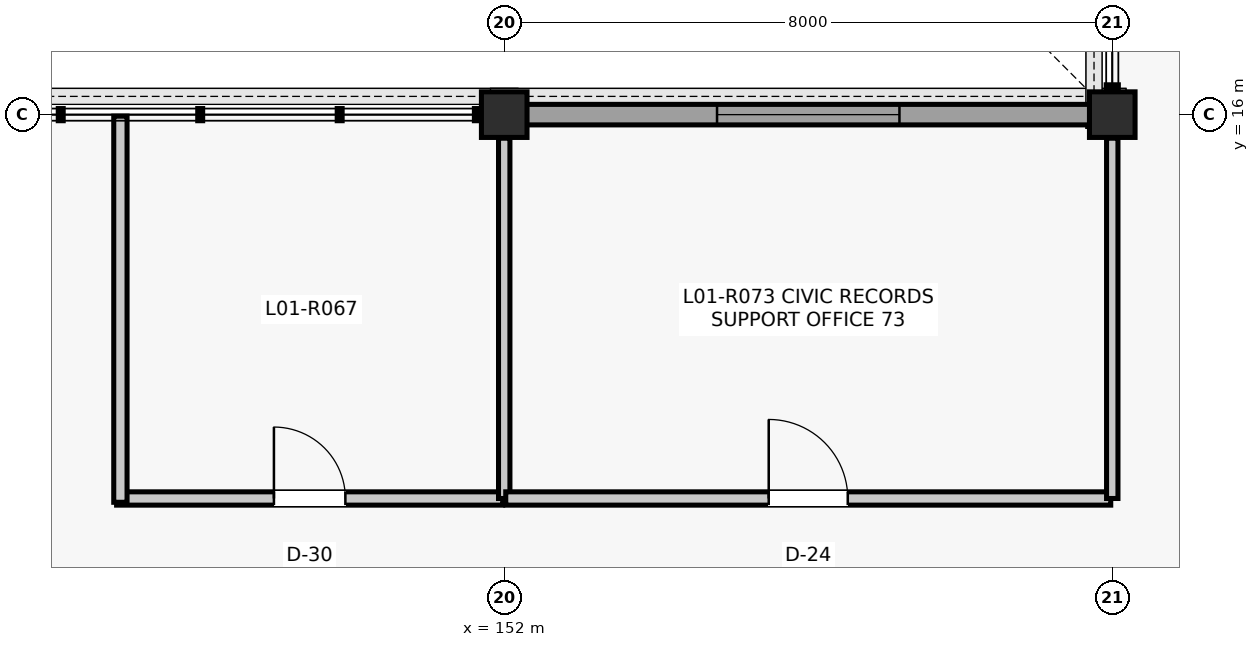
"""IFC4 building model, lengths in metres.
Left out: names, types, materials, properties, quantities, classifications, styles, units other than length and angle.
Written with IfcOpenShell. Run it as: python <this file> out.ifc"""

import sys

from ifc_helpers import new_model, si_unit, direction, frame, frame_2d, origin, origin_2d, place, context, subcontext, project, spatial, rectangle, extrude, element, fill, save


model = new_model("IFC4")
c1 = context("Model", 3, precision=1e-05, world=origin(), true_north=direction((0.0, 1.0)))
c2 = subcontext(c1, "Body", "Model", "MODEL_VIEW")
j1 = project(units=[si_unit("LENGTHUNIT", "METRE"), si_unit("PLANEANGLEUNIT", "RADIAN")], contexts=[c1])
p1 = place(None, origin())
s1 = spatial("IfcSite", under=j1, at=p1, CompositionType="ELEMENT")
p2 = place(p1, origin())
s2 = spatial("IfcBuilding", under=s1, at=p2, CompositionType="ELEMENT")
p3 = place(p2, frame((0.0, 0.0, 5.28)))
s3 = spatial("IfcBuildingStorey", under=s2, at=p3, CompositionType="ELEMENT", Elevation=5.28)
for number, where, z_axis, x_axis in (
    (1, (152.0, 16.0, 0.0), (0.0, 0.0, 1.0), (1.0, 0.0, 0.0)),
    (2, (160.0, 16.0, 0.0), (0.0, 0.0, 1.0), (1.0, 0.0, 0.0)),
):
    element("IfcColumn", number, at=place(p3, frame(where, z_axis=z_axis, x_axis=x_axis)), inside=s3, PredefinedType="COLUMN", context=c2, shape_type="SweptSolid", body=[
        extrude(rectangle(XDim=0.6, YDim=0.6, at=origin_2d()), origin(), (0.0, 0.0, 1.0), 4.62),
    ])
p4 = place(p3, frame((152.285, 16.0, 0.0), z_axis=(0.0, 0.0, 1.0), x_axis=(1.0, 0.0, 0.0)))
e3 = element("IfcWall", 3, at=p4, inside=s3, PredefinedType="SOLIDWALL", context=c2, shape_type="SweptSolid", body=[
    extrude(rectangle(XDim=7.43, YDim=0.27, at=frame_2d((3.715, 0.0))), origin(), (0.0, 0.0, 1.0), 3.794),
])
p5 = place(p4, frame((2.515, 0.0, 0.9)))
e4 = element("IfcOpeningElement", 4, at=p5, cuts=e3, PredefinedType="OPENING", context=c2, shape_type="SweptSolid", body=[
    extrude(rectangle(XDim=2.4, YDim=2.4, at=frame_2d((1.2, 1.2))), frame((0.0, 0.145, 0.0), z_axis=(0.0, -1.0, 0.0), x_axis=(1.0, 0.0, 0.0)), (0.0, 0.0, 1.0), 0.29),
])
p6 = place(p3, frame((146.9, 10.95, 0.0), z_axis=(0.0, 0.0, 1.0), x_axis=(1.0, 0.0, 0.0)))
e5 = element("IfcWall", 5, at=p6, inside=s3, PredefinedType="PARTITIONING", context=c2, shape_type="SweptSolid", body=[
    extrude(rectangle(XDim=5.08, YDim=0.175, at=frame_2d((2.54, 0.0))), origin(), (0.0, 0.0, 1.0), 3.787),
])
p7 = place(p6, frame((2.07, 0.0, 0.0)))
e6 = element("IfcOpeningElement", 6, at=p7, cuts=e5, PredefinedType="OPENING", context=c2, shape_type="SweptSolid", body=[
    extrude(rectangle(XDim=0.94, YDim=2.12, at=frame_2d((0.47, 1.06))), frame((0.0, 0.097, 0.0), z_axis=(0.0, -1.0, 0.0), x_axis=(1.0, 0.0, 0.0)), (0.0, 0.0, 1.0), 0.195),
])
p8 = place(p3, frame((146.95, 10.9, 0.0), z_axis=(0.0, 0.0, 1.0), x_axis=(0.0, 1.0, 0.0)))
e7 = element("IfcWall", 7, at=p8, inside=s3, PredefinedType="PARTITIONING", context=c2, shape_type="SweptSolid", body=[
    extrude(rectangle(XDim=5.08, YDim=0.175, at=frame_2d((2.54, 0.0))), origin(), (0.0, 0.0, 1.0), 3.712),
])
p9 = place(p3, frame((152.0, 10.95, 0.0), z_axis=(0.0, 0.0, 1.0), x_axis=(0.0, 1.0, 0.0)))
e8 = element("IfcWall", 8, at=p9, inside=s3, PredefinedType="PARTITIONING", context=c2, shape_type="SweptSolid", body=[
    extrude(rectangle(XDim=4.74, YDim=0.15, at=frame_2d((2.37, 0.0))), origin(), (0.0, 0.0, 1.0), 3.787),
])
p10 = place(p3, frame((152.02, 10.95, 0.0), z_axis=(0.0, 0.0, 1.0), x_axis=(1.0, 0.0, 0.0)))
e9 = element("IfcWall", 9, at=p10, inside=s3, PredefinedType="PARTITIONING", context=c2, shape_type="SweptSolid", body=[
    extrude(rectangle(XDim=7.96, YDim=0.175, at=frame_2d((3.98, 0.0))), origin(), (0.0, 0.0, 1.0), 3.787),
])
p11 = place(p10, frame((3.46, 0.0, 0.0)))
e10 = element("IfcOpeningElement", 10, at=p11, cuts=e9, PredefinedType="OPENING", context=c2, shape_type="SweptSolid", body=[
    extrude(rectangle(XDim=1.04, YDim=2.18, at=frame_2d((0.52, 1.09))), frame((0.0, 0.097, 0.0), z_axis=(0.0, -1.0, 0.0), x_axis=(1.0, 0.0, 0.0)), (0.0, 0.0, 1.0), 0.195),
])
p12 = place(p3, frame((160.0, 10.95, 0.0), z_axis=(0.0, 0.0, 1.0), x_axis=(0.0, 1.0, 0.0)))
e11 = element("IfcWall", 11, at=p12, inside=s3, PredefinedType="PARTITIONING", context=c2, shape_type="SweptSolid", body=[
    extrude(rectangle(XDim=4.74, YDim=0.15, at=frame_2d((2.37, 0.0))), origin(), (0.0, 0.0, 1.0), 3.857),
])
p13 = place(p5, origin())
e12 = element("IfcWindow", 12, at=p13, inside=s3, PartitioningType="SINGLE_PANEL", PredefinedType="WINDOW", context=c2, shape_type="SweptSolid", body=[
    extrude(rectangle(XDim=2.4, YDim=2.4, at=frame_2d((1.2, 1.2))), frame((0.0, 0.03, 0.0), z_axis=(0.0, -1.0, 0.0), x_axis=(1.0, 0.0, 0.0)), (0.0, 0.0, 1.0), 0.06),
])
fill(e4, e12)
p14 = place(p7, origin())
e13 = element("IfcDoor", 13, at=p14, inside=s3, OperationType="SINGLE_SWING_LEFT", PredefinedType="DOOR", context=c2, shape_type="SweptSolid", body=[
    extrude(rectangle(XDim=0.94, YDim=2.12, at=frame_2d((0.47, 1.06))), frame((0.0, 0.025, 0.0), z_axis=(0.0, -1.0, 0.0), x_axis=(1.0, 0.0, 0.0)), (0.0, 0.0, 1.0), 0.05),
])
fill(e6, e13)
p15 = place(p11, origin())
e14 = element("IfcDoor", 14, at=p15, inside=s3, OperationType="SINGLE_SWING_LEFT", PredefinedType="DOOR", context=c2, shape_type="SweptSolid", body=[
    extrude(rectangle(XDim=1.04, YDim=2.18, at=frame_2d((0.52, 1.09))), frame((0.0, 0.025, 0.0), z_axis=(0.0, -1.0, 0.0), x_axis=(1.0, 0.0, 0.0)), (0.0, 0.0, 1.0), 0.05),
])
fill(e10, e14)
save(model, sys.argv[1])
